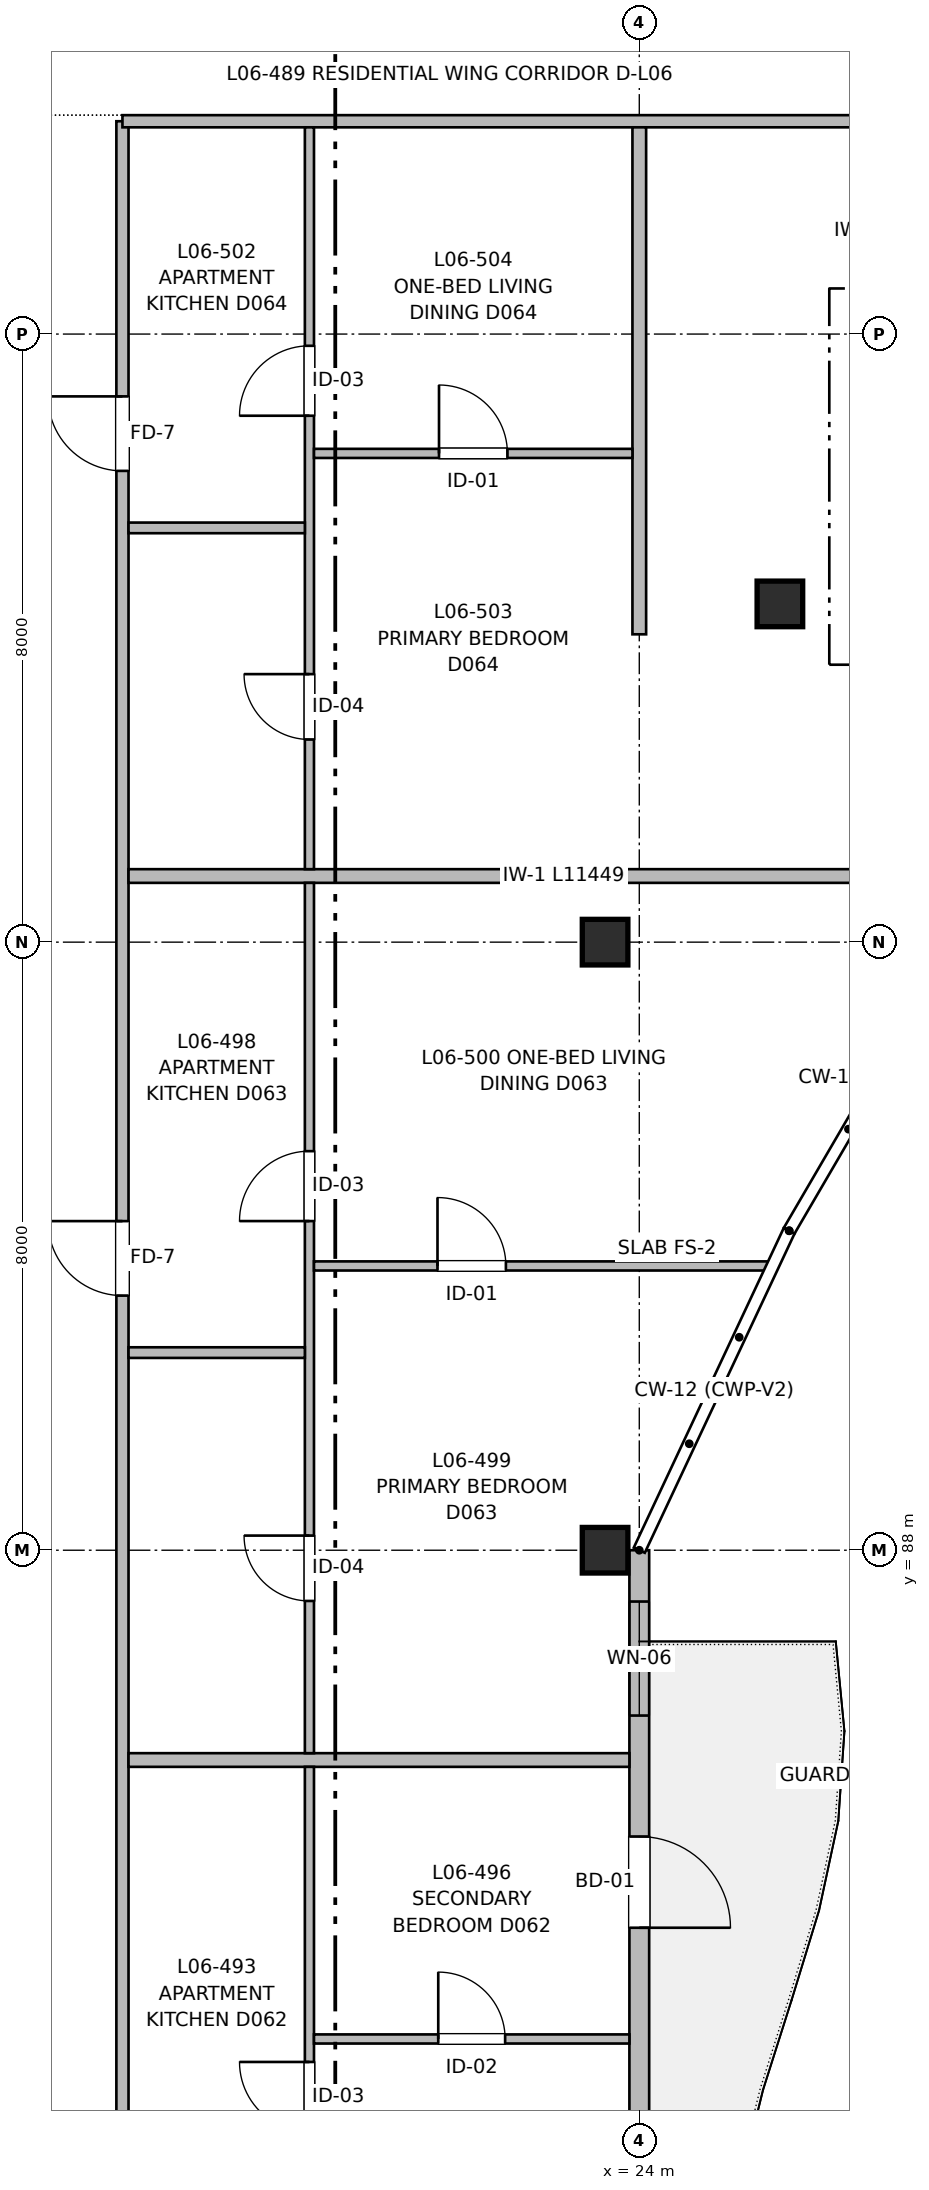
"""IFC4 building model, lengths in metres.
Left out: names, types, materials, properties, quantities, classifications, styles, units other than length and angle.
Written with IfcOpenShell. Run it as: python <this file> out.ifc"""

import sys

from ifc_helpers import new_model, si_unit, direction, frame, frame_2d, origin, origin_2d, place, context, subcontext, project, spatial, rectangle, extrude, element, fill, save


model = new_model("IFC4")
c1 = context("Model", 3, precision=1e-05, world=origin(), true_north=direction((0.0, 1.0)))
c2 = subcontext(c1, "Body", "Model", "MODEL_VIEW")
j1 = project(units=[si_unit("LENGTHUNIT", "METRE"), si_unit("PLANEANGLEUNIT", "RADIAN")], contexts=[c1])
p1 = place(None, origin())
s1 = spatial("IfcSite", under=j1, at=p1, CompositionType="ELEMENT")
p2 = place(p1, origin())
s2 = spatial("IfcBuilding", under=s1, at=p2, CompositionType="ELEMENT")
p3 = place(p2, frame((0.0, 0.0, 20.16)))
s3 = spatial("IfcBuildingStorey", under=s2, at=p3, CompositionType="ELEMENT", Elevation=20.16)
for number, where, z_axis, x_axis in (
    (1, (23.55, 88.0, 0.0), (0.0, 0.0, 1.0), (1.0, 0.0, 0.0)),
    (2, (23.55, 96.0, 0.0), (0.0, 0.0, 1.0), (1.0, 0.0, 0.0)),
    (3, (25.85, 100.45, 0.0), (0.0, 0.0, 1.0), (1.0, 0.0, 0.0)),
):
    element("IfcColumn", number, at=place(p3, frame(where, z_axis=z_axis, x_axis=x_axis)), inside=s3, PredefinedType="COLUMN", context=c2, shape_type="SweptSolid", body=[
        extrude(rectangle(XDim=0.6, YDim=0.6, at=origin_2d()), origin(), (0.0, 0.0, 1.0), 3.2),
    ])
p4 = place(p3, frame((24.0, 88.0, 0.0), z_axis=(0.0, 0.0, 1.0), x_axis=(0.0, -1.0, 0.0)))
e4 = element("IfcWall", 4, at=p4, inside=s3, PredefinedType="SOLIDWALL", context=c2, shape_type="SweptSolid", body=[
    extrude(rectangle(XDim=26.2, YDim=0.26, at=frame_2d((13.1, 0.0))), origin(), (0.0, 0.0, 1.0), 2.98),
])
p5 = place(p4, frame((3.767, 0.0, 0.0)))
e5 = element("IfcOpeningElement", 5, at=p5, cuts=e4, PredefinedType="OPENING", context=c2, shape_type="SweptSolid", body=[
    extrude(rectangle(XDim=1.2, YDim=2.2, at=frame_2d((0.6, 1.1))), frame((0.0, 0.14, 0.0), z_axis=(0.0, -1.0, 0.0), x_axis=(1.0, 0.0, 0.0)), (0.0, 0.0, 1.0), 0.28),
])
p6 = place(p4, frame((8.667, 0.0, 0.57)))
e6 = element("IfcOpeningElement", 6, at=p6, cuts=e4, PredefinedType="OPENING", context=c2, shape_type="SweptSolid", body=[
    extrude(rectangle(XDim=2.3, YDim=1.65, at=frame_2d((1.15, 0.825))), frame((0.0, 0.14, 0.0), z_axis=(0.0, -1.0, 0.0), x_axis=(1.0, 0.0, 0.0)), (0.0, 0.0, 1.0), 0.28),
])
p7 = place(p4, frame((12.5, 0.0, 0.9)))
e7 = element("IfcOpeningElement", 7, at=p7, cuts=e4, PredefinedType="OPENING", context=c2, shape_type="SweptSolid", body=[
    extrude(rectangle(XDim=1.2, YDim=1.05, at=frame_2d((0.6, 0.525))), frame((0.0, 0.14, 0.0), z_axis=(0.0, -1.0, 0.0), x_axis=(1.0, 0.0, 0.0)), (0.0, 0.0, 1.0), 0.28),
])
p8 = place(p4, frame((21.508, 0.0, 0.9)))
e8 = element("IfcOpeningElement", 8, at=p8, cuts=e4, PredefinedType="OPENING", context=c2, shape_type="SweptSolid", body=[
    extrude(rectangle(XDim=0.65, YDim=0.95, at=frame_2d((0.325, 0.475))), frame((0.0, 0.14, 0.0), z_axis=(0.0, -1.0, 0.0), x_axis=(1.0, 0.0, 0.0)), (0.0, 0.0, 1.0), 0.28),
])
p9 = place(p4, frame((0.675, 0.0, 0.82)))
e9 = element("IfcOpeningElement", 9, at=p9, cuts=e4, PredefinedType="OPENING", context=c2, shape_type="SweptSolid", body=[
    extrude(rectangle(XDim=1.5, YDim=1.4, at=frame_2d((0.75, 0.7))), frame((0.0, 0.14, 0.0), z_axis=(0.0, -1.0, 0.0), x_axis=(1.0, 0.0, 0.0)), (0.0, 0.0, 1.0), 0.28),
])
p10 = place(p3, frame((17.2, 61.96, 0.0), z_axis=(0.0, 0.0, 1.0), x_axis=(0.0, 1.0, 0.0)))
e10 = element("IfcWall", 10, at=p10, inside=s3, PredefinedType="PARTITIONING", context=c2, shape_type="SweptSolid", body=[
    extrude(rectangle(XDim=44.84, YDim=0.16, at=frame_2d((22.42, 0.0))), origin(), (0.0, 0.0, 1.0), 2.935),
])
p11 = place(p10, frame((4.575, 0.0, 0.0)))
e11 = element("IfcOpeningElement", 11, at=p11, cuts=e10, PredefinedType="OPENING", context=c2, shape_type="SweptSolid", body=[
    extrude(rectangle(XDim=1.5, YDim=2.2, at=frame_2d((0.75, 1.1))), frame((0.0, 0.09, 0.0), z_axis=(0.0, -1.0, 0.0), x_axis=(1.0, 0.0, 0.0)), (0.0, 0.0, 1.0), 0.18),
])
p12 = place(p10, frame((17.27, 0.0, 0.0)))
e12 = element("IfcOpeningElement", 12, at=p12, cuts=e10, PredefinedType="OPENING", context=c2, shape_type="SweptSolid", body=[
    extrude(rectangle(XDim=0.98, YDim=2.15, at=frame_2d((0.49, 1.075))), frame((0.0, 0.09, 0.0), z_axis=(0.0, -1.0, 0.0), x_axis=(1.0, 0.0, 0.0)), (0.0, 0.0, 1.0), 0.18),
])
p13 = place(p10, frame((29.39, 0.0, 0.0)))
e13 = element("IfcOpeningElement", 13, at=p13, cuts=e10, PredefinedType="OPENING", context=c2, shape_type="SweptSolid", body=[
    extrude(rectangle(XDim=0.98, YDim=2.15, at=frame_2d((0.49, 1.075))), frame((0.0, 0.09, 0.0), z_axis=(0.0, -1.0, 0.0), x_axis=(1.0, 0.0, 0.0)), (0.0, 0.0, 1.0), 0.18),
])
p14 = place(p10, frame((40.24, 0.0, 0.0)))
e14 = element("IfcOpeningElement", 14, at=p14, cuts=e10, PredefinedType="OPENING", context=c2, shape_type="SweptSolid", body=[
    extrude(rectangle(XDim=0.98, YDim=2.15, at=frame_2d((0.49, 1.075))), frame((0.0, 0.09, 0.0), z_axis=(0.0, -1.0, 0.0), x_axis=(1.0, 0.0, 0.0)), (0.0, 0.0, 1.0), 0.18),
])
p15 = place(p3, frame((17.2, 106.8, 0.0), z_axis=(0.0, 0.0, 1.0), x_axis=(1.0, 0.0, 0.0)))
e15 = element("IfcWall", 15, at=p15, inside=s3, PredefinedType="PARTITIONING", context=c2, shape_type="SweptSolid", body=[
    extrude(rectangle(XDim=17.64, YDim=0.16, at=frame_2d((8.82, 0.0))), origin(), (0.0, 0.0, 1.0), 2.935),
])
p16 = place(p15, frame((13.075, 0.0, 0.0)))
e16 = element("IfcOpeningElement", 16, at=p16, cuts=e15, PredefinedType="OPENING", context=c2, shape_type="SweptSolid", body=[
    extrude(rectangle(XDim=1.05, YDim=2.15, at=frame_2d((0.525, 1.075))), frame((0.0, 0.09, 0.0), z_axis=(0.0, -1.0, 0.0), x_axis=(1.0, 0.0, 0.0)), (0.0, 0.0, 1.0), 0.18),
])
p17 = place(p3, frame((24.0, 100.05, 0.0), z_axis=(0.0, 0.0, 1.0), x_axis=(0.0, 1.0, 0.0)))
e17 = element("IfcWall", 17, at=p17, inside=s3, PredefinedType="PARTITIONING", context=c2, shape_type="SweptSolid", body=[
    extrude(rectangle(XDim=6.67, YDim=0.18, at=frame_2d((3.335, 0.0))), origin(), (0.0, 0.0, 1.0), 2.935),
])
p18 = place(p3, frame((17.28, 85.24, 0.0), z_axis=(0.0, 0.0, 1.0), x_axis=(1.0, 0.0, 0.0)))
e18 = element("IfcWall", 18, at=p18, inside=s3, PredefinedType="PARTITIONING", context=c2, shape_type="SweptSolid", body=[
    extrude(rectangle(XDim=6.59, YDim=0.18, at=frame_2d((3.295, 0.0))), origin(), (0.0, 0.0, 1.0), 2.935),
])
p19 = place(p3, frame((17.28, 96.87, 0.0), z_axis=(0.0, 0.0, 1.0), x_axis=(1.0, 0.0, 0.0)))
e19 = element("IfcWall", 19, at=p19, inside=s3, PredefinedType="PARTITIONING", context=c2, shape_type="SweptSolid", body=[
    extrude(rectangle(XDim=11.449, YDim=0.18, at=frame_2d((5.724, 0.0))), origin(), (0.0, 0.0, 1.0), 2.935),
])
p20 = place(p3, frame((19.66, 72.79, 0.0), z_axis=(0.0, 0.0, 1.0), x_axis=(0.0, 1.0, 0.0)))
e20 = element("IfcWall", 20, at=p20, inside=s3, PredefinedType="PARTITIONING", context=c2, shape_type="SweptSolid", body=[
    extrude(rectangle(XDim=12.36, YDim=0.12, at=frame_2d((6.18, 0.0))), origin(), (0.0, 0.0, 1.0), 2.935),
])
p21 = place(p20, frame((2.162, 0.0, 0.0)))
e21 = element("IfcOpeningElement", 21, at=p21, cuts=e20, PredefinedType="OPENING", context=c2, shape_type="SweptSolid", body=[
    extrude(rectangle(XDim=0.86, YDim=2.1, at=frame_2d((0.43, 1.05))), frame((0.0, 0.07, 0.0), z_axis=(0.0, -1.0, 0.0), x_axis=(1.0, 0.0, 0.0)), (0.0, 0.0, 1.0), 0.14),
])
p22 = place(p20, frame((7.558, 0.0, 0.0)))
e22 = element("IfcOpeningElement", 22, at=p22, cuts=e20, PredefinedType="OPENING", context=c2, shape_type="SweptSolid", body=[
    extrude(rectangle(XDim=0.92, YDim=2.1, at=frame_2d((0.46, 1.05))), frame((0.0, 0.07, 0.0), z_axis=(0.0, -1.0, 0.0), x_axis=(1.0, 0.0, 0.0)), (0.0, 0.0, 1.0), 0.14),
])
p23 = place(p3, frame((19.72, 81.57, 0.0), z_axis=(0.0, 0.0, 1.0), x_axis=(1.0, 0.0, 0.0)))
e23 = element("IfcWall", 23, at=p23, inside=s3, PredefinedType="PARTITIONING", context=c2, shape_type="SweptSolid", body=[
    extrude(rectangle(XDim=4.15, YDim=0.12, at=frame_2d((2.075, 0.0))), origin(), (0.0, 0.0, 1.0), 2.935),
])
p24 = place(p23, frame((1.635, 0.0, 0.0)))
e24 = element("IfcOpeningElement", 24, at=p24, cuts=e23, PredefinedType="OPENING", context=c2, shape_type="SweptSolid", body=[
    extrude(rectangle(XDim=0.88, YDim=2.1, at=frame_2d((0.44, 1.05))), frame((0.0, 0.07, 0.0), z_axis=(0.0, -1.0, 0.0), x_axis=(1.0, 0.0, 0.0)), (0.0, 0.0, 1.0), 0.14),
])
p25 = place(p3, frame((19.66, 85.33, 0.0), z_axis=(0.0, 0.0, 1.0), x_axis=(0.0, 1.0, 0.0)))
e25 = element("IfcWall", 25, at=p25, inside=s3, PredefinedType="PARTITIONING", context=c2, shape_type="SweptSolid", body=[
    extrude(rectangle(XDim=11.45, YDim=0.12, at=frame_2d((5.725, 0.0))), origin(), (0.0, 0.0, 1.0), 2.935),
])
p26 = place(p25, frame((2.003, 0.0, 0.0)))
e26 = element("IfcOpeningElement", 26, at=p26, cuts=e25, PredefinedType="OPENING", context=c2, shape_type="SweptSolid", body=[
    extrude(rectangle(XDim=0.86, YDim=2.1, at=frame_2d((0.43, 1.05))), frame((0.0, 0.07, 0.0), z_axis=(0.0, -1.0, 0.0), x_axis=(1.0, 0.0, 0.0)), (0.0, 0.0, 1.0), 0.14),
])
p27 = place(p25, frame((7.0, 0.0, 0.0)))
e27 = element("IfcOpeningElement", 27, at=p27, cuts=e25, PredefinedType="OPENING", context=c2, shape_type="SweptSolid", body=[
    extrude(rectangle(XDim=0.92, YDim=2.1, at=frame_2d((0.46, 1.05))), frame((0.0, 0.07, 0.0), z_axis=(0.0, -1.0, 0.0), x_axis=(1.0, 0.0, 0.0)), (0.0, 0.0, 1.0), 0.14),
])
p28 = place(p3, frame((17.28, 90.6, 0.0), z_axis=(0.0, 0.0, 1.0), x_axis=(1.0, 0.0, 0.0)))
e28 = element("IfcWall", 28, at=p28, inside=s3, PredefinedType="PARTITIONING", context=c2, shape_type="SweptSolid", body=[
    extrude(rectangle(XDim=2.32, YDim=0.14, at=frame_2d((1.16, 0.0))), origin(), (0.0, 0.0, 1.0), 2.935),
])
p29 = place(p3, frame((19.72, 91.74, 0.0), z_axis=(0.0, 0.0, 1.0), x_axis=(1.0, 0.0, 0.0)))
e29 = element("IfcWall", 29, at=p29, inside=s3, PredefinedType="PARTITIONING", context=c2, shape_type="SweptSolid", body=[
    extrude(rectangle(XDim=5.991, YDim=0.12, at=frame_2d((2.995, 0.0))), origin(), (0.0, 0.0, 1.0), 2.935),
])
p30 = place(p29, frame((1.625, 0.0, 0.0)))
e30 = element("IfcOpeningElement", 30, at=p30, cuts=e29, PredefinedType="OPENING", context=c2, shape_type="SweptSolid", body=[
    extrude(rectangle(XDim=0.9, YDim=2.1, at=frame_2d((0.45, 1.05))), frame((0.0, 0.07, 0.0), z_axis=(0.0, -1.0, 0.0), x_axis=(1.0, 0.0, 0.0)), (0.0, 0.0, 1.0), 0.14),
])
p31 = place(p3, frame((19.66, 96.96, 0.0), z_axis=(0.0, 0.0, 1.0), x_axis=(0.0, 1.0, 0.0)))
e31 = element("IfcWall", 31, at=p31, inside=s3, PredefinedType="PARTITIONING", context=c2, shape_type="SweptSolid", body=[
    extrude(rectangle(XDim=9.76, YDim=0.12, at=frame_2d((4.88, 0.0))), origin(), (0.0, 0.0, 1.0), 2.935),
])
p32 = place(p31, frame((1.706, 0.0, 0.0)))
e32 = element("IfcOpeningElement", 32, at=p32, cuts=e31, PredefinedType="OPENING", context=c2, shape_type="SweptSolid", body=[
    extrude(rectangle(XDim=0.86, YDim=2.1, at=frame_2d((0.43, 1.05))), frame((0.0, 0.07, 0.0), z_axis=(0.0, -1.0, 0.0), x_axis=(1.0, 0.0, 0.0)), (0.0, 0.0, 1.0), 0.14),
])
p33 = place(p31, frame((5.966, 0.0, 0.0)))
e33 = element("IfcOpeningElement", 33, at=p33, cuts=e31, PredefinedType="OPENING", context=c2, shape_type="SweptSolid", body=[
    extrude(rectangle(XDim=0.92, YDim=2.1, at=frame_2d((0.46, 1.05))), frame((0.0, 0.07, 0.0), z_axis=(0.0, -1.0, 0.0), x_axis=(1.0, 0.0, 0.0)), (0.0, 0.0, 1.0), 0.14),
])
p34 = place(p3, frame((17.28, 101.45, 0.0), z_axis=(0.0, 0.0, 1.0), x_axis=(1.0, 0.0, 0.0)))
e34 = element("IfcWall", 34, at=p34, inside=s3, PredefinedType="PARTITIONING", context=c2, shape_type="SweptSolid", body=[
    extrude(rectangle(XDim=2.32, YDim=0.14, at=frame_2d((1.16, 0.0))), origin(), (0.0, 0.0, 1.0), 2.935),
])
p35 = place(p3, frame((19.72, 102.43, 0.0), z_axis=(0.0, 0.0, 1.0), x_axis=(1.0, 0.0, 0.0)))
e35 = element("IfcWall", 35, at=p35, inside=s3, PredefinedType="PARTITIONING", context=c2, shape_type="SweptSolid", body=[
    extrude(rectangle(XDim=4.19, YDim=0.12, at=frame_2d((2.095, 0.0))), origin(), (0.0, 0.0, 1.0), 2.935),
])
p36 = place(p35, frame((1.645, 0.0, 0.0)))
e36 = element("IfcOpeningElement", 36, at=p36, cuts=e35, PredefinedType="OPENING", context=c2, shape_type="SweptSolid", body=[
    extrude(rectangle(XDim=0.9, YDim=2.1, at=frame_2d((0.45, 1.05))), frame((0.0, 0.07, 0.0), z_axis=(0.0, -1.0, 0.0), x_axis=(1.0, 0.0, 0.0)), (0.0, 0.0, 1.0), 0.14),
])
p37 = place(p5, origin())
e37 = element("IfcDoor", 37, at=p37, inside=s3, OperationType="SINGLE_SWING_RIGHT", PredefinedType="DOOR", context=c2, shape_type="SweptSolid", body=[
    extrude(rectangle(XDim=1.2, YDim=2.2, at=frame_2d((0.6, 1.1))), frame((0.0, 0.025, 0.0), z_axis=(0.0, -1.0, 0.0), x_axis=(1.0, 0.0, 0.0)), (0.0, 0.0, 1.0), 0.05),
])
fill(e5, e37)
p38 = place(p22, origin())
e38 = element("IfcDoor", 38, at=p38, inside=s3, OperationType="SINGLE_SWING_RIGHT", PredefinedType="DOOR", context=c2, shape_type="SweptSolid", body=[
    extrude(rectangle(XDim=0.92, YDim=2.1, at=frame_2d((0.46, 1.05))), frame((0.0, 0.025, 0.0), z_axis=(0.0, -1.0, 0.0), x_axis=(1.0, 0.0, 0.0)), (0.0, 0.0, 1.0), 0.05),
])
fill(e22, e38)
p39 = place(p24, origin())
e39 = element("IfcDoor", 39, at=p39, inside=s3, OperationType="SINGLE_SWING_LEFT", PredefinedType="DOOR", context=c2, shape_type="SweptSolid", body=[
    extrude(rectangle(XDim=0.88, YDim=2.1, at=frame_2d((0.44, 1.05))), frame((0.0, 0.025, 0.0), z_axis=(0.0, -1.0, 0.0), x_axis=(1.0, 0.0, 0.0)), (0.0, 0.0, 1.0), 0.05),
])
fill(e24, e39)
p40 = place(p26, origin())
e40 = element("IfcDoor", 40, at=p40, inside=s3, OperationType="SINGLE_SWING_RIGHT", PredefinedType="DOOR", context=c2, shape_type="SweptSolid", body=[
    extrude(rectangle(XDim=0.86, YDim=2.1, at=frame_2d((0.43, 1.05))), frame((0.0, 0.025, 0.0), z_axis=(0.0, -1.0, 0.0), x_axis=(1.0, 0.0, 0.0)), (0.0, 0.0, 1.0), 0.05),
])
fill(e26, e40)
p41 = place(p27, origin())
e41 = element("IfcDoor", 41, at=p41, inside=s3, OperationType="SINGLE_SWING_LEFT", PredefinedType="DOOR", context=c2, shape_type="SweptSolid", body=[
    extrude(rectangle(XDim=0.92, YDim=2.1, at=frame_2d((0.46, 1.05))), frame((0.0, 0.025, 0.0), z_axis=(0.0, -1.0, 0.0), x_axis=(1.0, 0.0, 0.0)), (0.0, 0.0, 1.0), 0.05),
])
fill(e27, e41)
p42 = place(p13, origin())
e42 = element("IfcDoor", 42, at=p42, inside=s3, OperationType="SINGLE_SWING_RIGHT", PredefinedType="DOOR", context=c2, shape_type="SweptSolid", body=[
    extrude(rectangle(XDim=0.98, YDim=2.15, at=frame_2d((0.49, 1.075))), frame((0.0, 0.025, 0.0), z_axis=(0.0, -1.0, 0.0), x_axis=(1.0, 0.0, 0.0)), (0.0, 0.0, 1.0), 0.05),
])
fill(e13, e42)
p43 = place(p30, origin())
e43 = element("IfcDoor", 43, at=p43, inside=s3, OperationType="SINGLE_SWING_LEFT", PredefinedType="DOOR", context=c2, shape_type="SweptSolid", body=[
    extrude(rectangle(XDim=0.9, YDim=2.1, at=frame_2d((0.45, 1.05))), frame((0.0, 0.025, 0.0), z_axis=(0.0, -1.0, 0.0), x_axis=(1.0, 0.0, 0.0)), (0.0, 0.0, 1.0), 0.05),
])
fill(e30, e43)
p44 = place(p32, origin())
e44 = element("IfcDoor", 44, at=p44, inside=s3, OperationType="SINGLE_SWING_RIGHT", PredefinedType="DOOR", context=c2, shape_type="SweptSolid", body=[
    extrude(rectangle(XDim=0.86, YDim=2.1, at=frame_2d((0.43, 1.05))), frame((0.0, 0.025, 0.0), z_axis=(0.0, -1.0, 0.0), x_axis=(1.0, 0.0, 0.0)), (0.0, 0.0, 1.0), 0.05),
])
fill(e32, e44)
p45 = place(p33, origin())
e45 = element("IfcDoor", 45, at=p45, inside=s3, OperationType="SINGLE_SWING_LEFT", PredefinedType="DOOR", context=c2, shape_type="SweptSolid", body=[
    extrude(rectangle(XDim=0.92, YDim=2.1, at=frame_2d((0.46, 1.05))), frame((0.0, 0.025, 0.0), z_axis=(0.0, -1.0, 0.0), x_axis=(1.0, 0.0, 0.0)), (0.0, 0.0, 1.0), 0.05),
])
fill(e33, e45)
p46 = place(p14, origin())
e46 = element("IfcDoor", 46, at=p46, inside=s3, OperationType="SINGLE_SWING_RIGHT", PredefinedType="DOOR", context=c2, shape_type="SweptSolid", body=[
    extrude(rectangle(XDim=0.98, YDim=2.15, at=frame_2d((0.49, 1.075))), frame((0.0, 0.025, 0.0), z_axis=(0.0, -1.0, 0.0), x_axis=(1.0, 0.0, 0.0)), (0.0, 0.0, 1.0), 0.05),
])
fill(e14, e46)
p47 = place(p36, origin())
e47 = element("IfcDoor", 47, at=p47, inside=s3, OperationType="SINGLE_SWING_LEFT", PredefinedType="DOOR", context=c2, shape_type="SweptSolid", body=[
    extrude(rectangle(XDim=0.9, YDim=2.1, at=frame_2d((0.45, 1.05))), frame((0.0, 0.025, 0.0), z_axis=(0.0, -1.0, 0.0), x_axis=(1.0, 0.0, 0.0)), (0.0, 0.0, 1.0), 0.05),
])
fill(e36, e47)
p48 = place(p9, origin())
e48 = element("IfcWindow", 48, at=p48, inside=s3, PartitioningType="SINGLE_PANEL", PredefinedType="WINDOW", context=c2, shape_type="SweptSolid", body=[
    extrude(rectangle(XDim=1.5, YDim=1.4, at=frame_2d((0.75, 0.7))), frame((0.0, 0.03, 0.0), z_axis=(0.0, -1.0, 0.0), x_axis=(1.0, 0.0, 0.0)), (0.0, 0.0, 1.0), 0.06),
])
fill(e9, e48)
save(model, sys.argv[1])
